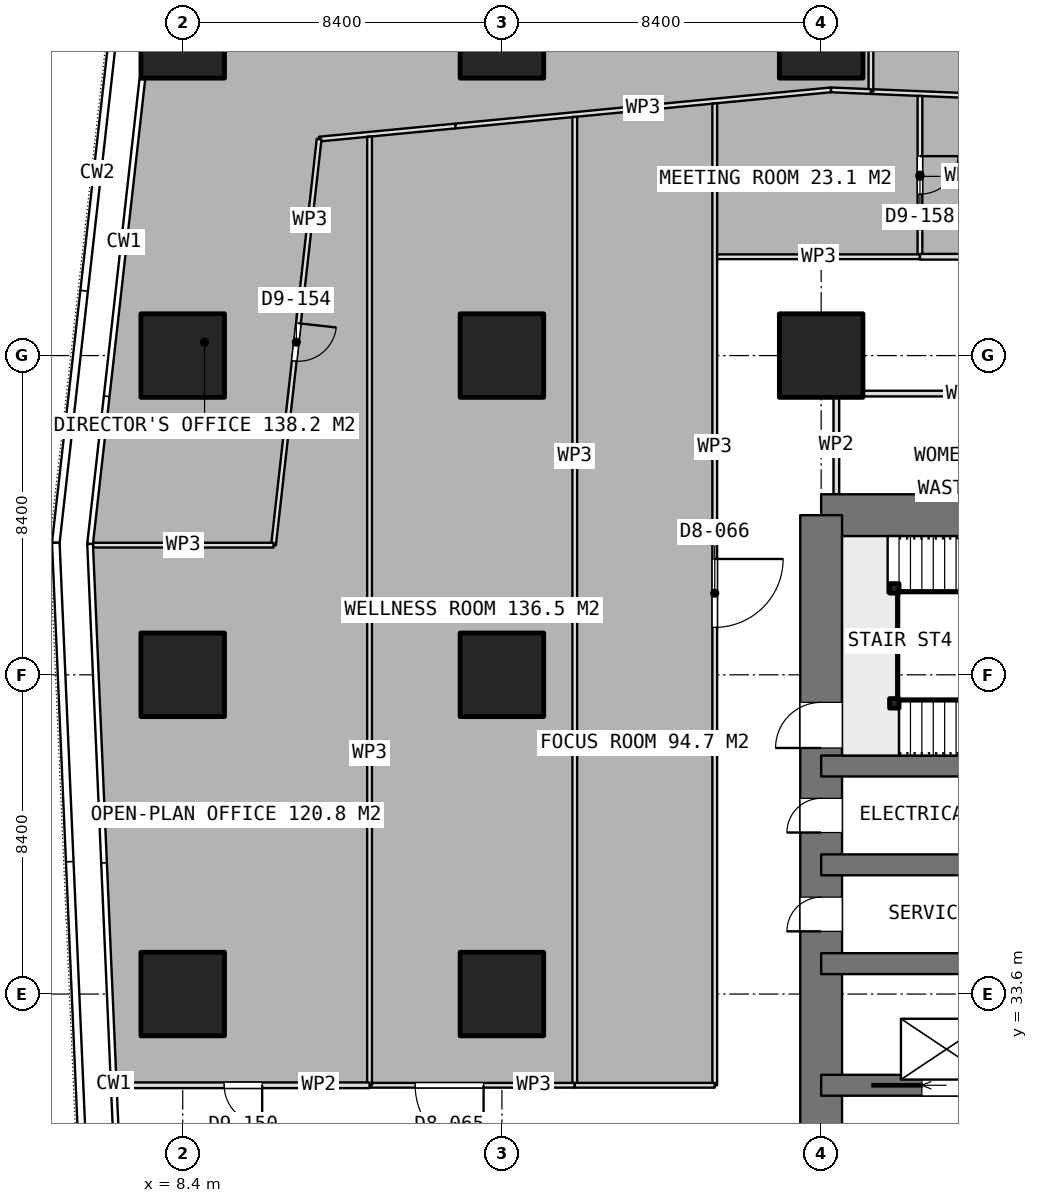
"""IFC4 building model, lengths in metres.
Left out: names, types, materials, properties, quantities, classifications, styles, units other than length and angle.
Written with IfcOpenShell. Run it as: python <this file> out.ifc"""

import sys

from ifc_helpers import new_model, si_unit, direction, frame, frame_2d, origin, origin_2d, place, context, subcontext, project, spatial, rectangle, extrude, element, fill, save


model = new_model("IFC4")
c1 = context("Model", 3, precision=1e-05, world=origin(), true_north=direction((0.0, 1.0)))
c2 = subcontext(c1, "Body", "Model", "MODEL_VIEW")
j1 = project(units=[si_unit("LENGTHUNIT", "METRE"), si_unit("PLANEANGLEUNIT", "RADIAN")], contexts=[c1])
p1 = place(None, origin())
s1 = spatial("IfcSite", under=j1, at=p1, CompositionType="ELEMENT")
p2 = place(p1, origin())
s2 = spatial("IfcBuilding", under=s1, at=p2, CompositionType="ELEMENT")
p3 = place(p2, frame((0.0, 0.0, 51.65)))
s3 = spatial("IfcBuildingStorey", under=s2, at=p3, CompositionType="ELEMENT", Elevation=51.65)
p4 = place(p3, frame((25.2, 46.2, 0.0), z_axis=(0.0, 0.0, 1.0), x_axis=(1.0, 0.0, 0.0)))
e1 = element("IfcWall", 1, at=p4, inside=s3, PredefinedType="SHEAR", context=c2, shape_type="SweptSolid", body=[
    extrude(rectangle(XDim=10.4, YDim=1.1, at=frame_2d((5.2, 0.0))), origin(), (0.0, 0.0, 1.0), 3.75),
])
p5 = place(p3, frame((25.2, 21.0, 0.0), z_axis=(0.0, 0.0, 1.0), x_axis=(0.0, 1.0, 0.0)))
e2 = element("IfcWall", 2, at=p5, inside=s3, PredefinedType="SHEAR", context=c2, shape_type="SweptSolid", body=[
    extrude(rectangle(XDim=25.2, YDim=1.1, at=frame_2d((12.6, 0.0))), origin(), (0.0, 0.0, 1.0), 3.75),
])
p6 = place(p5, frame((7.8, 0.0, 0.0)))
e3 = element("IfcOpeningElement", 3, at=p6, cuts=e2, PredefinedType="OPENING", context=c2, shape_type="SweptSolid", body=[
    extrude(rectangle(XDim=1.2, YDim=2.1, at=frame_2d((0.6, 1.05))), frame((0.0, 0.56, 0.0), z_axis=(0.0, -1.0, 0.0), x_axis=(1.0, 0.0, 0.0)), (0.0, 0.0, 1.0), 1.12),
])
p7 = place(p5, frame((14.25, 0.0, 0.0)))
e4 = element("IfcOpeningElement", 4, at=p7, cuts=e2, PredefinedType="OPENING", context=c2, shape_type="SweptSolid", body=[
    extrude(rectangle(XDim=0.9, YDim=2.1, at=frame_2d((0.45, 1.05))), frame((0.0, 0.56, 0.0), z_axis=(0.0, -1.0, 0.0), x_axis=(1.0, 0.0, 0.0)), (0.0, 0.0, 1.0), 1.12),
])
p8 = place(p5, frame((16.85, 0.0, 0.0)))
e5 = element("IfcOpeningElement", 5, at=p8, cuts=e2, PredefinedType="OPENING", context=c2, shape_type="SweptSolid", body=[
    extrude(rectangle(XDim=0.9, YDim=2.1, at=frame_2d((0.45, 1.05))), frame((0.0, 0.56, 0.0), z_axis=(0.0, -1.0, 0.0), x_axis=(1.0, 0.0, 0.0)), (0.0, 0.0, 1.0), 1.12),
])
p9 = place(p5, frame((19.075, 0.0, 0.0)))
e6 = element("IfcOpeningElement", 6, at=p9, cuts=e2, PredefinedType="OPENING", context=c2, shape_type="SweptSolid", body=[
    extrude(rectangle(XDim=1.2, YDim=2.1, at=frame_2d((0.6, 1.05))), frame((0.0, 0.56, 0.0), z_axis=(0.0, -1.0, 0.0), x_axis=(1.0, 0.0, 0.0)), (0.0, 0.0, 1.0), 1.12),
])
p10 = place(p3, frame((25.2, 31.2, 0.0), z_axis=(0.0, 0.0, 1.0), x_axis=(1.0, 0.0, 0.0)))
e7 = element("IfcWall", 7, at=p10, inside=s3, PredefinedType="SHEAR", context=c2, shape_type="SweptSolid", body=[
    extrude(rectangle(XDim=6.6, YDim=0.55, at=frame_2d((3.3, 0.0))), origin(), (0.0, 0.0, 1.0), 3.75),
])
p11 = place(p10, frame((2.65, 0.0, 0.0)))
e8 = element("IfcOpeningElement", 8, at=p11, cuts=e7, PredefinedType="OPENING", context=c2, shape_type="SweptSolid", body=[
    extrude(rectangle(XDim=1.3, YDim=2.1, at=frame_2d((0.65, 1.05))), frame((0.0, 0.285, 0.0), z_axis=(0.0, -1.0, 0.0), x_axis=(1.0, 0.0, 0.0)), (0.0, 0.0, 1.0), 0.57),
])
for number, where, z_axis, x_axis in (
    (9, (25.2, 34.4, 0.0), (0.0, 0.0, 1.0), (1.0, 0.0, 0.0)),
    (10, (25.2, 37.0, 0.0), (0.0, 0.0, 1.0), (1.0, 0.0, 0.0)),
    (11, (25.2, 39.6, 0.0), (0.0, 0.0, 1.0), (1.0, 0.0, 0.0)),
):
    element("IfcWall", number, at=place(p3, frame(where, z_axis=z_axis, x_axis=x_axis)), inside=s3, PredefinedType="SHEAR", context=c2, shape_type="SweptSolid", body=[
        extrude(rectangle(XDim=6.6, YDim=0.55, at=frame_2d((3.3, 0.0))), origin(), (0.0, 0.0, 1.0), 3.75),
    ])
for number, where, z_axis, x_axis in (
    (12, (8.4, 33.6, 0.0), (0.0, 0.0, 1.0), (1.0, 0.0, 0.0)),
    (13, (8.4, 42.0, 0.0), (0.0, 0.0, 1.0), (1.0, 0.0, 0.0)),
    (14, (8.4, 50.4, 0.0), (0.0, 0.0, 1.0), (1.0, 0.0, 0.0)),
    (15, (8.4, 58.8, 0.0), (0.0, 0.0, 1.0), (1.0, 0.0, 0.0)),
    (16, (16.8, 33.6, 0.0), (0.0, 0.0, 1.0), (1.0, 0.0, 0.0)),
    (17, (16.8, 42.0, 0.0), (0.0, 0.0, 1.0), (1.0, 0.0, 0.0)),
    (18, (16.8, 50.4, 0.0), (0.0, 0.0, 1.0), (1.0, 0.0, 0.0)),
    (19, (16.8, 58.8, 0.0), (0.0, 0.0, 1.0), (1.0, 0.0, 0.0)),
    (20, (25.2, 50.4, 0.0), (0.0, 0.0, 1.0), (1.0, 0.0, 0.0)),
    (21, (25.2, 58.8, 0.0), (0.0, 0.0, 1.0), (1.0, 0.0, 0.0)),
):
    element("IfcColumn", number, at=place(p3, frame(where, z_axis=z_axis, x_axis=x_axis)), inside=s3, PredefinedType="COLUMN", context=c2, shape_type="SweptSolid", body=[
        extrude(rectangle(XDim=2.2, YDim=2.2, at=origin_2d()), origin(), (0.0, 0.0, 1.0), 3.75),
    ])
p12 = place(p3, frame((25.525, 49.4, 0.0), z_axis=(0.0, 0.0, 1.0), x_axis=(1.0, 0.0, 0.0)))
e22 = element("IfcWall", 22, at=p12, inside=s3, PredefinedType="PARTITIONING", context=c2, shape_type="SweptSolid", body=[
    extrude(rectangle(XDim=9.75, YDim=0.15, at=frame_2d((4.875, 0.0))), origin(), (0.0, 0.0, 1.0), 3.5),
])
p13 = place(p12, frame((4.375, 0.0, 0.0)))
e23 = element("IfcOpeningElement", 23, at=p13, cuts=e22, PredefinedType="OPENING", context=c2, shape_type="SweptSolid", body=[
    extrude(rectangle(XDim=1.0, YDim=2.1, at=frame_2d((0.5, 1.05))), frame((0.0, 0.085, 0.0), z_axis=(0.0, -1.0, 0.0), x_axis=(1.0, 0.0, 0.0)), (0.0, 0.0, 1.0), 0.17),
])
p14 = place(p3, frame((25.6, 46.75, 0.0), z_axis=(0.0, 0.0, 1.0), x_axis=(0.0, 1.0, 0.0)))
e24 = element("IfcWall", 24, at=p14, inside=s3, PredefinedType="PARTITIONING", context=c2, shape_type="SweptSolid", body=[
    extrude(rectangle(XDim=2.575, YDim=0.15, at=frame_2d((1.288, 0.0))), origin(), (0.0, 0.0, 1.0), 3.5),
])
p15 = place(p3, frame((34.021, 57.037, 0.0), z_axis=(0.0, 0.0, 1.0), x_axis=(-0.999150378183, 0.041213126277, 0.0)))
e25 = element("IfcWall", 25, at=p15, inside=s3, PredefinedType="PARTITIONING", context=c2, shape_type="SweptSolid", body=[
    extrude(rectangle(XDim=7.517, YDim=0.125, at=frame_2d((3.759, 0.0))), origin(), (0.0, 0.0, 1.0), 3.5),
])
p16 = place(p15, frame((3.259, 0.0, 0.0)))
e26 = element("IfcOpeningElement", 26, at=p16, cuts=e25, PredefinedType="OPENING", context=c2, shape_type="SweptSolid", body=[
    extrude(rectangle(XDim=1.0, YDim=2.1, at=frame_2d((0.5, 1.05))), frame((0.0, 0.073, 0.0), z_axis=(0.0, -1.0, 0.0), x_axis=(1.0, 0.0, 0.0)), (0.0, 0.0, 1.0), 0.145),
])
p17 = place(p3, frame((26.51, 57.347, 0.0), z_axis=(0.0, 0.0, 1.0), x_axis=(0.0, 1.0, 0.0)))
e27 = element("IfcWall", 27, at=p17, inside=s3, PredefinedType="PARTITIONING", context=c2, shape_type="SweptSolid", body=[
    extrude(rectangle(XDim=4.724, YDim=0.125, at=frame_2d((2.362, 0.0))), origin(), (0.0, 0.0, 1.0), 3.5),
])
p18 = place(p3, frame((26.509, 57.347, 0.0), z_axis=(0.0, 0.0, 1.0), x_axis=(-0.999118951292, 0.041968097049, 0.0)))
e28 = element("IfcWall", 28, at=p18, inside=s3, PredefinedType="PARTITIONING", context=c2, shape_type="SweptSolid", body=[
    extrude(rectangle(XDim=1.053, YDim=0.125, at=frame_2d((0.526, 0.0))), origin(), (0.0, 0.0, 1.0), 3.5),
])
p19 = place(p3, frame((25.457, 57.391, 0.0), z_axis=(0.0, 0.0, 1.0), x_axis=(-0.995401503094, -0.095790644833, 0.0)))
e29 = element("IfcWall", 29, at=p19, inside=s3, PredefinedType="PARTITIONING", context=c2, shape_type="SweptSolid", body=[
    extrude(rectangle(XDim=9.93, YDim=0.125, at=frame_2d((4.965, 0.0))), origin(), (0.0, 0.0, 1.0), 3.5),
])
p20 = place(p3, frame((15.572, 56.44, 0.0), z_axis=(0.0, 0.0, 1.0), x_axis=(-0.995420457926, -0.095593472275, 0.0)))
e30 = element("IfcWall", 30, at=p20, inside=s3, PredefinedType="PARTITIONING", context=c2, shape_type="SweptSolid", body=[
    extrude(rectangle(XDim=3.599, YDim=0.125, at=frame_2d((1.799, 0.0))), origin(), (0.0, 0.0, 1.0), 3.5),
])
p21 = place(p3, frame((11.99, 56.096, 0.0), z_axis=(0.0, 0.0, 1.0), x_axis=(-0.111612849984, -0.993751765643, 0.0)))
e31 = element("IfcWall", 31, at=p21, inside=s3, PredefinedType="PARTITIONING", context=c2, shape_type="SweptSolid", body=[
    extrude(rectangle(XDim=10.751, YDim=0.125, at=frame_2d((5.375, 0.0))), origin(), (0.0, 0.0, 1.0), 3.5),
])
p22 = place(p21, frame((4.876, 0.0, 0.0)))
e32 = element("IfcOpeningElement", 32, at=p22, cuts=e31, PredefinedType="OPENING", context=c2, shape_type="SweptSolid", body=[
    extrude(rectangle(XDim=1.0, YDim=2.1, at=frame_2d((0.5, 1.05))), frame((0.0, 0.073, 0.0), z_axis=(0.0, -1.0, 0.0), x_axis=(1.0, 0.0, 0.0)), (0.0, 0.0, 1.0), 0.145),
])
p23 = place(p3, frame((10.79, 45.412, 0.0), z_axis=(0.0, 0.0, 1.0), x_axis=(-1.0, 0.0, 0.0)))
e33 = element("IfcWall", 33, at=p23, inside=s3, PredefinedType="PARTITIONING", context=c2, shape_type="SweptSolid", body=[
    extrude(rectangle(XDim=4.746, YDim=0.125, at=frame_2d((2.373, 0.0))), origin(), (0.0, 0.0, 1.0), 3.5),
])
p24 = place(p3, frame((18.717, 56.68, 0.0), z_axis=(0.0, 0.0, 1.0), x_axis=(0.0, -1.0, 0.0)))
e34 = element("IfcWall", 34, at=p24, inside=s3, PredefinedType="PARTITIONING", context=c2, shape_type="SweptSolid", body=[
    extrude(rectangle(XDim=25.48, YDim=0.125, at=frame_2d((12.74, 0.0))), origin(), (0.0, 0.0, 1.0), 3.5),
])
p25 = place(p3, frame((18.717, 31.2, 0.0), z_axis=(0.0, 0.0, 1.0), x_axis=(-1.0, 0.0, 0.0)))
e35 = element("IfcWall", 35, at=p25, inside=s3, PredefinedType="PARTITIONING", context=c2, shape_type="SweptSolid", body=[
    extrude(rectangle(XDim=5.4, YDim=0.125, at=frame_2d((2.7, 0.0))), origin(), (0.0, 0.0, 1.0), 3.5),
])
p26 = place(p25, frame((2.4, 0.0, 0.0)))
e36 = element("IfcOpeningElement", 36, at=p26, cuts=e35, PredefinedType="OPENING", context=c2, shape_type="SweptSolid", body=[
    extrude(rectangle(XDim=1.8, YDim=2.1, at=frame_2d((0.9, 1.05))), frame((0.0, 0.073, 0.0), z_axis=(0.0, -1.0, 0.0), x_axis=(1.0, 0.0, 0.0)), (0.0, 0.0, 1.0), 0.145),
])
p27 = place(p3, frame((13.317, 31.2, 0.0), z_axis=(0.0, 0.0, 1.0), x_axis=(0.0, 1.0, 0.0)))
e37 = element("IfcWall", 37, at=p27, inside=s3, PredefinedType="PARTITIONING", context=c2, shape_type="SweptSolid", body=[
    extrude(rectangle(XDim=24.961, YDim=0.125, at=frame_2d((12.48, 0.0))), origin(), (0.0, 0.0, 1.0), 3.5),
])
p28 = place(p3, frame((22.4, 57.034, 0.0), z_axis=(0.0, 0.0, 1.0), x_axis=(0.0, -1.0, 0.0)))
e38 = element("IfcWall", 38, at=p28, inside=s3, PredefinedType="PARTITIONING", context=c2, shape_type="SweptSolid", body=[
    extrude(rectangle(XDim=25.834, YDim=0.125, at=frame_2d((12.917, 0.0))), origin(), (0.0, 0.0, 1.0), 3.5),
])
p29 = place(p28, frame((11.986, 0.0, 0.0)))
e39 = element("IfcOpeningElement", 39, at=p29, cuts=e38, PredefinedType="OPENING", context=c2, shape_type="SweptSolid", body=[
    extrude(rectangle(XDim=1.8, YDim=2.1, at=frame_2d((0.9, 1.05))), frame((0.0, 0.073, 0.0), z_axis=(0.0, -1.0, 0.0), x_axis=(1.0, 0.0, 0.0)), (0.0, 0.0, 1.0), 0.145),
])
p30 = place(p3, frame((22.4, 31.2, 0.0), z_axis=(0.0, 0.0, 1.0), x_axis=(-1.0, 0.0, 0.0)))
e40 = element("IfcWall", 40, at=p30, inside=s3, PredefinedType="PARTITIONING", context=c2, shape_type="SweptSolid", body=[
    extrude(rectangle(XDim=3.683, YDim=0.125, at=frame_2d((1.841, 0.0))), origin(), (0.0, 0.0, 1.0), 3.5),
])
p31 = place(p3, frame((27.8, 57.231, 0.0), z_axis=(0.0, 0.0, 1.0), x_axis=(0.0, -1.0, 0.0)))
e41 = element("IfcWall", 41, at=p31, inside=s3, PredefinedType="PARTITIONING", context=c2, shape_type="SweptSolid", body=[
    extrude(rectangle(XDim=4.231, YDim=0.125, at=frame_2d((2.115, 0.0))), origin(), (0.0, 0.0, 1.0), 3.5),
])
p32 = place(p31, frame((1.584, 0.0, 0.0)))
e42 = element("IfcOpeningElement", 42, at=p32, cuts=e41, PredefinedType="OPENING", context=c2, shape_type="SweptSolid", body=[
    extrude(rectangle(XDim=1.0, YDim=2.1, at=frame_2d((0.5, 1.05))), frame((0.0, 0.073, 0.0), z_axis=(0.0, -1.0, 0.0), x_axis=(1.0, 0.0, 0.0)), (0.0, 0.0, 1.0), 0.145),
])
p33 = place(p3, frame((27.8, 53.0, 0.0), z_axis=(0.0, 0.0, 1.0), x_axis=(-1.0, 0.0, 0.0)))
e43 = element("IfcWall", 43, at=p33, inside=s3, PredefinedType="PARTITIONING", context=c2, shape_type="SweptSolid", body=[
    extrude(rectangle(XDim=5.338, YDim=0.125, at=frame_2d((2.669, 0.0))), origin(), (0.0, 0.0, 1.0), 3.5),
])
p34 = place(p3, frame((36.3, 53.0, 0.0), z_axis=(0.0, 0.0, 1.0), x_axis=(-1.0, 0.0, 0.0)))
e44 = element("IfcWall", 44, at=p34, inside=s3, PredefinedType="PARTITIONING", context=c2, shape_type="SweptSolid", body=[
    extrude(rectangle(XDim=8.5, YDim=0.15, at=frame_2d((4.25, 0.0))), origin(), (0.0, 0.0, 1.0), 3.5),
])
p35 = place(p34, frame((3.75, 0.0, 0.0)))
e45 = element("IfcOpeningElement", 45, at=p35, cuts=e44, PredefinedType="OPENING", context=c2, shape_type="SweptSolid", body=[
    extrude(rectangle(XDim=1.0, YDim=2.1, at=frame_2d((0.5, 1.05))), frame((0.0, 0.085, 0.0), z_axis=(0.0, -1.0, 0.0), x_axis=(1.0, 0.0, 0.0)), (0.0, 0.0, 1.0), 0.17),
])
p36 = place(p3, frame((13.317, 31.2, 0.0), z_axis=(0.0, 0.0, 1.0), x_axis=(-1.0, 0.0, 0.0)))
e46 = element("IfcWall", 46, at=p36, inside=s3, PredefinedType="PARTITIONING", context=c2, shape_type="SweptSolid", body=[
    extrude(rectangle(XDim=6.682, YDim=0.15, at=frame_2d((3.341, 0.0))), origin(), (0.0, 0.0, 1.0), 3.5),
])
p37 = place(p36, frame((2.826, 0.0, 0.0)))
e47 = element("IfcOpeningElement", 47, at=p37, cuts=e46, PredefinedType="OPENING", context=c2, shape_type="SweptSolid", body=[
    extrude(rectangle(XDim=1.0, YDim=2.1, at=frame_2d((0.5, 1.05))), frame((0.0, 0.085, 0.0), z_axis=(0.0, -1.0, 0.0), x_axis=(1.0, 0.0, 0.0)), (0.0, 0.0, 1.0), 0.17),
])
for number, where, z_axis, x_axis in (
    (48, (27.125, 41.25, 0.0), (0.0, 0.0, 1.0), (1.0, 0.0, 0.0)),
    (49, (27.125, 44.275, 0.0), (0.0, 0.0, 1.0), (1.0, 0.0, 0.0)),
):
    element("IfcColumn", number, at=place(p3, frame(where, z_axis=z_axis, x_axis=x_axis)), inside=s3, PredefinedType="COLUMN", context=c2, shape_type="SweptSolid", body=[
        extrude(rectangle(XDim=0.25, YDim=0.25, at=origin_2d()), origin(), (0.0, 0.0, 1.0), 3.75),
    ])
p38 = place(p7, origin())
e50 = element("IfcDoor", 50, at=p38, inside=s3, OperationType="SINGLE_SWING_LEFT", PredefinedType="DOOR", context=c2, shape_type="SweptSolid", body=[
    extrude(rectangle(XDim=0.9, YDim=2.1, at=frame_2d((0.45, 1.05))), frame((0.0, 0.025, 0.0), z_axis=(0.0, -1.0, 0.0), x_axis=(1.0, 0.0, 0.0)), (0.0, 0.0, 1.0), 0.05),
])
fill(e4, e50)
p39 = place(p8, origin())
e51 = element("IfcDoor", 51, at=p39, inside=s3, OperationType="SINGLE_SWING_LEFT", PredefinedType="DOOR", context=c2, shape_type="SweptSolid", body=[
    extrude(rectangle(XDim=0.9, YDim=2.1, at=frame_2d((0.45, 1.05))), frame((0.0, 0.025, 0.0), z_axis=(0.0, -1.0, 0.0), x_axis=(1.0, 0.0, 0.0)), (0.0, 0.0, 1.0), 0.05),
])
fill(e5, e51)
p40 = place(p11, origin())
e52 = element("IfcDoor", 52, at=p40, inside=s3, OperationType="SLIDING_TO_LEFT", PredefinedType="USERDEFINED", context=c2, shape_type="SweptSolid", body=[
    extrude(rectangle(XDim=1.3, YDim=2.1, at=frame_2d((0.65, 1.05))), frame((0.0, 0.025, 0.0), z_axis=(0.0, -1.0, 0.0), x_axis=(1.0, 0.0, 0.0)), (0.0, 0.0, 1.0), 0.05),
])
fill(e8, e52)
p41 = place(p22, origin())
e53 = element("IfcDoor", 53, at=p41, inside=s3, OperationType="SINGLE_SWING_LEFT", PredefinedType="DOOR", context=c2, shape_type="SweptSolid", body=[
    extrude(rectangle(XDim=1.0, YDim=2.1, at=frame_2d((0.5, 1.05))), frame((0.0, 0.025, 0.0), z_axis=(0.0, -1.0, 0.0), x_axis=(1.0, 0.0, 0.0)), (0.0, 0.0, 1.0), 0.05),
])
fill(e32, e53)
p42 = place(p26, origin())
e54 = element("IfcDoor", 54, at=p42, inside=s3, OperationType="DOUBLE_DOOR_SINGLE_SWING", PredefinedType="DOOR", context=c2, shape_type="SweptSolid", body=[
    extrude(rectangle(XDim=1.8, YDim=2.1, at=frame_2d((0.9, 1.05))), frame((0.0, 0.025, 0.0), z_axis=(0.0, -1.0, 0.0), x_axis=(1.0, 0.0, 0.0)), (0.0, 0.0, 1.0), 0.05),
])
fill(e36, e54)
p43 = place(p29, origin())
e55 = element("IfcDoor", 55, at=p43, inside=s3, OperationType="DOUBLE_DOOR_SINGLE_SWING", PredefinedType="DOOR", context=c2, shape_type="SweptSolid", body=[
    extrude(rectangle(XDim=1.8, YDim=2.1, at=frame_2d((0.9, 1.05))), frame((0.0, 0.025, 0.0), z_axis=(0.0, -1.0, 0.0), x_axis=(1.0, 0.0, 0.0)), (0.0, 0.0, 1.0), 0.05),
])
fill(e39, e55)
p44 = place(p32, origin())
e56 = element("IfcDoor", 56, at=p44, inside=s3, OperationType="SINGLE_SWING_LEFT", PredefinedType="DOOR", context=c2, shape_type="SweptSolid", body=[
    extrude(rectangle(XDim=1.0, YDim=2.1, at=frame_2d((0.5, 1.05))), frame((0.0, 0.025, 0.0), z_axis=(0.0, -1.0, 0.0), x_axis=(1.0, 0.0, 0.0)), (0.0, 0.0, 1.0), 0.05),
])
fill(e42, e56)
p45 = place(p37, origin())
e57 = element("IfcDoor", 57, at=p45, inside=s3, OperationType="SINGLE_SWING_LEFT", PredefinedType="DOOR", context=c2, shape_type="SweptSolid", body=[
    extrude(rectangle(XDim=1.0, YDim=2.1, at=frame_2d((0.5, 1.05))), frame((0.0, 0.025, 0.0), z_axis=(0.0, -1.0, 0.0), x_axis=(1.0, 0.0, 0.0)), (0.0, 0.0, 1.0), 0.05),
])
fill(e47, e57)
p46 = place(p9, origin())
e58 = element("IfcDoor", 58, at=p46, inside=s3, OperationType="SINGLE_SWING_RIGHT", PredefinedType="DOOR", context=c2, shape_type="SweptSolid", body=[
    extrude(rectangle(XDim=1.2, YDim=2.1, at=frame_2d((0.6, 1.05))), frame((0.0, 0.025, 0.0), z_axis=(0.0, -1.0, 0.0), x_axis=(1.0, 0.0, 0.0)), (0.0, 0.0, 1.0), 0.05),
])
fill(e6, e58)
save(model, sys.argv[1])
